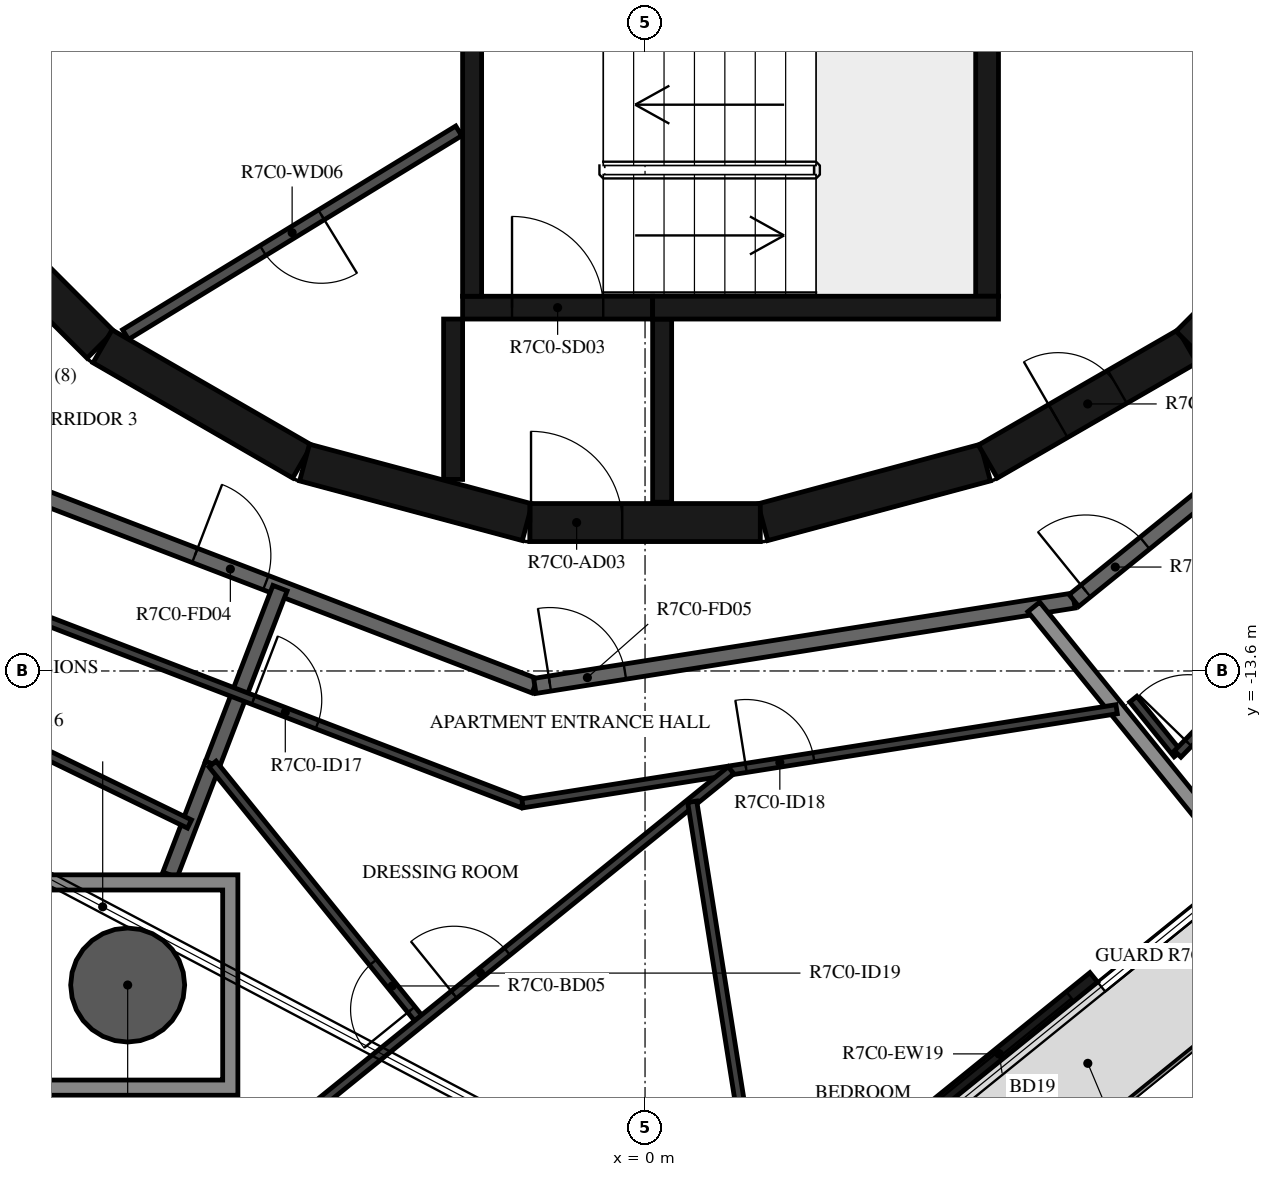
"""IFC4 building model, lengths in metres.
Left out: names, types, materials, properties, quantities, classifications, styles, units other than length and angle.
Written with IfcOpenShell. Run it as: python <this file> out.ifc"""

import sys

from ifc_helpers import new_model, si_unit, direction, frame, frame_2d, origin, origin_2d, place, context, subcontext, project, spatial, polyline, rectangle, hollow_circle, outline, extrude, element, fill, save


model = new_model("IFC4")
c1 = context("Model", 3, precision=1e-05, world=origin(), true_north=direction((0.0, 1.0)))
c2 = subcontext(c1, "Body", "Model", "MODEL_VIEW")
j1 = project(units=[si_unit("LENGTHUNIT", "METRE"), si_unit("PLANEANGLEUNIT", "RADIAN")], contexts=[c1])
p1 = place(None, origin())
s1 = spatial("IfcSite", under=j1, at=p1, CompositionType="ELEMENT")
p2 = place(p1, origin())
s2 = spatial("IfcBuilding", under=s1, at=p2, CompositionType="ELEMENT")
p3 = place(p2, frame((0.0, 0.0, 284.4)))
s3 = spatial("IfcBuildingStorey", under=s2, at=p3, CompositionType="ELEMENT", Elevation=284.4)
p4 = place(p3, frame((-6.807, -17.732, -0.38), z_axis=(0.0, 0.0, 1.0), x_axis=(1.0, 0.0, 0.0)))
e1 = element("IfcColumn", 1, at=p4, inside=s3, PredefinedType="COLUMN", context=c2, shape_type="SweptSolid", body=[
    extrude(hollow_circle(Radius=0.75, WallThickness=0.035, at=origin_2d()), origin(), (0.0, 0.0, 1.0), 3.5),
])
p5 = place(p3, frame((3.417, -19.645, 0.0), z_axis=(0.0, 0.0, 1.0), x_axis=(0.777125818, 0.629345265333, 0.0)))
e2 = element("IfcWall", 2, at=p5, inside=s3, PredefinedType="STANDARD", context=c2, shape_type="SweptSolid", body=[
    extrude(rectangle(XDim=3.2, YDim=0.16, at=frame_2d((1.6, 0.0))), origin(), (0.0, 0.0, 1.0), 3.12),
])
p6 = place(p5, frame((0.4, 0.0, 0.0)))
e3 = element("IfcOpeningElement", 3, at=p6, cuts=e2, PredefinedType="OPENING", context=c2, shape_type="SweptSolid", body=[
    extrude(rectangle(XDim=2.4, YDim=2.4, at=frame_2d((1.2, 1.2))), frame((0.0, 0.09, 0.0), z_axis=(0.0, -1.0, 0.0), x_axis=(1.0, 0.0, 0.0)), (0.0, 0.0, 1.0), 0.18),
])
p7 = place(p3, frame((1.55, -11.643, 0.0), z_axis=(0.0, 0.0, 1.0), x_axis=(0.965948410781, 0.258734743916, 0.0)))
e4 = element("IfcWall", 4, at=p7, inside=s3, PredefinedType="SHEAR", context=c2, shape_type="SweptSolid", body=[
    extrude(rectangle(XDim=3.033, YDim=0.5, at=frame_2d((1.516, 0.0))), origin(), (0.0, 0.0, 1.0), 3.12),
])
p8 = place(p3, frame((4.51, -10.845, 0.0), z_axis=(0.0, 0.0, 1.0), x_axis=(0.865975092491, 0.500087131594, 0.0)))
e5 = element("IfcWall", 5, at=p8, inside=s3, PredefinedType="SHEAR", context=c2, shape_type="SweptSolid", body=[
    extrude(rectangle(XDim=3.033, YDim=0.5, at=frame_2d((1.516, 0.0))), origin(), (0.0, 0.0, 1.0), 3.12),
])
p9 = place(p8, frame((1.066, 0.0, 0.0)))
e6 = element("IfcOpeningElement", 6, at=p9, cuts=e5, PredefinedType="OPENING", context=c2, shape_type="SweptSolid", body=[
    extrude(rectangle(XDim=0.9, YDim=2.1, at=frame_2d((0.45, 1.05))), frame((0.0, 0.26, 0.0), z_axis=(0.0, -1.0, 0.0), x_axis=(1.0, 0.0, 0.0)), (0.0, 0.0, 1.0), 0.52),
])
for number, where, z_axis, x_axis in (
    (7, (7.164, -9.308, 0.0), (0.0, 0.0, 1.0), (0.707, 0.707, 0.0)),
    (8, (-9.308, -7.164, 0.0), (0.0, 0.0, 1.0), (0.707, -0.707, 0.0)),
):
    element("IfcWall", number, at=place(p3, frame(where, z_axis=z_axis, x_axis=x_axis)), inside=s3, PredefinedType="SHEAR", context=c2, shape_type="SweptSolid", body=[
        extrude(rectangle(XDim=3.032, YDim=0.5, at=frame_2d((1.516, 0.0))), origin(), (0.0, 0.0, 1.0), 3.12),
    ])
for number, where, z_axis, x_axis in (
    (9, (-7.137, -9.329, 0.0), (0.0, 0.0, 1.0), (0.866, -0.5, 0.0)),
    (10, (-4.479, -10.858, 0.0), (0.0, 0.0, 1.0), (0.966, -0.259, 0.0)),
):
    element("IfcWall", number, at=place(p3, frame(where, z_axis=z_axis, x_axis=x_axis)), inside=s3, PredefinedType="SHEAR", context=c2, shape_type="SweptSolid", body=[
        extrude(rectangle(XDim=3.033, YDim=0.5, at=frame_2d((1.516, 0.0))), origin(), (0.0, 0.0, 1.0), 3.12),
    ])
p10 = place(p3, frame((-1.516, -11.647, 0.0), z_axis=(0.0, 0.0, 1.0), x_axis=(1.0, 0.0, 0.0)))
e11 = element("IfcWall", 11, at=p10, inside=s3, PredefinedType="SHEAR", context=c2, shape_type="SweptSolid", body=[
    extrude(rectangle(XDim=3.033, YDim=0.5, at=frame_2d((1.516, 0.0))), origin(), (0.0, 0.0, 1.0), 3.12),
])
p11 = place(p10, frame((0.016, 0.0, 0.0)))
e12 = element("IfcOpeningElement", 12, at=p11, cuts=e11, PredefinedType="OPENING", context=c2, shape_type="SweptSolid", body=[
    extrude(rectangle(XDim=1.2, YDim=2.1, at=frame_2d((0.6, 1.05))), frame((0.0, 0.26, 0.0), z_axis=(0.0, -1.0, 0.0), x_axis=(1.0, 0.0, 0.0)), (0.0, 0.0, 1.0), 0.52),
])
p12 = place(p3, frame((-2.275, -8.67, 0.0), z_axis=(0.0, 0.0, 1.0), x_axis=(0.0, 1.0, 0.0)))
e13 = element("IfcWall", 13, at=p12, inside=s3, PredefinedType="SHEAR", context=c2, shape_type="SweptSolid", body=[
    extrude(rectangle(XDim=3.32, YDim=0.25, at=frame_2d((1.66, 0.0))), origin(), (0.0, 0.0, 1.0), 3.12),
])
p13 = place(p3, frame((4.5, -8.67, 0.0), z_axis=(0.0, 0.0, 1.0), x_axis=(0.0, 1.0, 0.0)))
e14 = element("IfcWall", 14, at=p13, inside=s3, PredefinedType="SHEAR", context=c2, shape_type="SweptSolid", body=[
    extrude(rectangle(XDim=3.32, YDim=0.3, at=frame_2d((1.66, 0.0))), origin(), (0.0, 0.0, 1.0), 3.12),
])
p14 = place(p3, frame((0.1, -8.82, 0.0), z_axis=(0.0, 0.0, 1.0), x_axis=(1.0, 0.0, 0.0)))
e15 = element("IfcWall", 15, at=p14, inside=s3, PredefinedType="SHEAR", context=c2, shape_type="SweptSolid", body=[
    extrude(rectangle(XDim=4.55, YDim=0.3, at=frame_2d((2.275, 0.0))), origin(), (0.0, 0.0, 1.0), 3.12),
])
p15 = place(p3, frame((-2.4, -8.82, 0.0), z_axis=(0.0, 0.0, 1.0), x_axis=(1.0, 0.0, 0.0)))
e16 = element("IfcWall", 16, at=p15, inside=s3, PredefinedType="SHEAR", context=c2, shape_type="SweptSolid", body=[
    extrude(rectangle(XDim=2.5, YDim=0.3, at=frame_2d((1.25, 0.0))), origin(), (0.0, 0.0, 1.0), 3.12),
])
p16 = place(p15, frame((0.65, 0.0, 0.0)))
e17 = element("IfcOpeningElement", 17, at=p16, cuts=e16, PredefinedType="OPENING", context=c2, shape_type="SweptSolid", body=[
    extrude(rectangle(XDim=1.2, YDim=2.1, at=frame_2d((0.6, 1.05))), frame((0.0, 0.16, 0.0), z_axis=(0.0, -1.0, 0.0), x_axis=(1.0, 0.0, 0.0)), (0.0, 0.0, 1.0), 0.32),
])
p17 = place(p3, frame((-2.525, -8.97, 0.0), z_axis=(0.0, 0.0, 1.0), x_axis=(0.0, -1.0, 0.0)))
e18 = element("IfcWall", 18, at=p17, inside=s3, PredefinedType="SHEAR", context=c2, shape_type="SweptSolid", body=[
    extrude(rectangle(XDim=2.11, YDim=0.25, at=frame_2d((1.055, 0.0))), origin(), (0.0, 0.0, 1.0), 3.12),
])
p18 = place(p3, frame((0.225, -8.97, 0.0), z_axis=(0.0, 0.0, 1.0), x_axis=(0.0, -1.0, 0.0)))
e19 = element("IfcWall", 19, at=p18, inside=s3, PredefinedType="SHEAR", context=c2, shape_type="SweptSolid", body=[
    extrude(rectangle(XDim=2.41, YDim=0.25, at=frame_2d((1.205, 0.0))), origin(), (0.0, 0.0, 1.0), 3.12),
])
p19 = place(p3, frame((-2.451, -6.495, 0.0), z_axis=(0.0, 0.0, 1.0), x_axis=(-0.853250115418, -0.521501908471, 0.0)))
e20 = element("IfcWall", 20, at=p19, inside=s3, PredefinedType="PARTITIONING", context=c2, shape_type="SweptSolid", body=[
    extrude(rectangle(XDim=5.137, YDim=0.15, at=frame_2d((2.569, 0.0))), origin(), (0.0, 0.0, 1.0), 3.12),
])
p20 = place(p19, frame((2.119, 0.0, 0.0)))
e21 = element("IfcOpeningElement", 21, at=p20, cuts=e20, PredefinedType="OPENING", context=c2, shape_type="SweptSolid", body=[
    extrude(rectangle(XDim=0.9, YDim=2.1, at=frame_2d((0.45, 1.05))), frame((0.0, 0.085, 0.0), z_axis=(0.0, -1.0, 0.0), x_axis=(1.0, 0.0, 0.0)), (0.0, 0.0, 1.0), 0.17),
])
p21 = place(p3, frame((-8.154, -11.223, 0.0), z_axis=(0.0, 0.0, 1.0), x_axis=(0.93359073609, -0.358341090983, 0.0)))
e22 = element("IfcWall", 22, at=p21, inside=s3, PredefinedType="STANDARD", context=c2, shape_type="SweptSolid", body=[
    extrude(rectangle(XDim=7.181, YDim=0.2, at=frame_2d((3.59, 0.0))), origin(), (0.0, 0.0, 1.0), 3.12),
])
p22 = place(p21, frame((2.39, 0.0, 0.0)))
e23 = element("IfcOpeningElement", 23, at=p22, cuts=e22, PredefinedType="OPENING", context=c2, shape_type="SweptSolid", body=[
    extrude(rectangle(XDim=1.0, YDim=2.1, at=frame_2d((0.5, 1.05))), frame((0.0, 0.11, 0.0), z_axis=(0.0, -1.0, 0.0), x_axis=(1.0, 0.0, 0.0)), (0.0, 0.0, 1.0), 0.22),
])
p23 = place(p3, frame((-1.45, -13.797, 0.0), z_axis=(0.0, 0.0, 1.0), x_axis=(0.987690361611, 0.156421704315, 0.0)))
e24 = element("IfcWall", 24, at=p23, inside=s3, PredefinedType="STANDARD", context=c2, shape_type="SweptSolid", body=[
    extrude(rectangle(XDim=7.181, YDim=0.2, at=frame_2d((3.591, 0.0))), origin(), (0.0, 0.0, 1.0), 3.12),
])
p24 = place(p23, frame((0.2, 0.0, 0.0)))
e25 = element("IfcOpeningElement", 25, at=p24, cuts=e24, PredefinedType="OPENING", context=c2, shape_type="SweptSolid", body=[
    extrude(rectangle(XDim=1.0, YDim=2.1, at=frame_2d((0.5, 1.05))), frame((0.0, 0.11, 0.0), z_axis=(0.0, -1.0, 0.0), x_axis=(1.0, 0.0, 0.0)), (0.0, 0.0, 1.0), 0.22),
])
p25 = place(p3, frame((5.643, -12.673, 0.0), z_axis=(0.0, 0.0, 1.0), x_axis=(0.777160148113, 0.629302871585, 0.0)))
e26 = element("IfcWall", 26, at=p25, inside=s3, PredefinedType="STANDARD", context=c2, shape_type="SweptSolid", body=[
    extrude(rectangle(XDim=7.181, YDim=0.2, at=frame_2d((3.59, 0.0))), origin(), (0.0, 0.0, 1.0), 3.12),
])
p26 = place(p25, frame((0.2, 0.0, 0.0)))
e27 = element("IfcOpeningElement", 27, at=p26, cuts=e26, PredefinedType="OPENING", context=c2, shape_type="SweptSolid", body=[
    extrude(rectangle(XDim=1.0, YDim=2.1, at=frame_2d((0.5, 1.05))), frame((0.0, 0.11, 0.0), z_axis=(0.0, -1.0, 0.0), x_axis=(1.0, 0.0, 0.0)), (0.0, 0.0, 1.0), 0.22),
])
p27 = place(p3, frame((-5.69, -14.824, 0.0), z_axis=(0.0, 0.0, 1.0), x_axis=(0.358345342952, 0.933589104041, 0.0)))
e28 = element("IfcWall", 28, at=p27, inside=s3, PredefinedType="STANDARD", context=c2, shape_type="SweptSolid", body=[
    extrude(rectangle(XDim=2.479, YDim=0.2, at=frame_2d((1.239, 0.0))), origin(), (0.0, 0.0, 1.0), 3.12),
])
p28 = place(p3, frame((-6.25, -16.282, 0.0), z_axis=(0.0, 0.0, 1.0), x_axis=(0.358360842469, 0.933583154617, 0.0)))
e29 = element("IfcWall", 29, at=p28, inside=s3, PredefinedType="STANDARD", context=c2, shape_type="SweptSolid", body=[
    extrude(rectangle(XDim=1.562, YDim=0.2, at=frame_2d((0.781, 0.0))), origin(), (0.0, 0.0, 1.0), 3.12),
])
p29 = place(p3, frame((-10.637, -24.738, 0.0), z_axis=(0.0, 0.0, 1.0), x_axis=(0.479683887596, 0.877441375808, 0.0)))
e30 = element("IfcWall", 30, at=p29, inside=s3, PredefinedType="STANDARD", context=c2, shape_type="SweptSolid", body=[
    extrude(rectangle(XDim=6.333, YDim=0.2, at=frame_2d((3.166, 0.0))), origin(), (0.0, 0.0, 1.0), 2.73),
])
p30 = place(p3, frame((7.861, -16.148, 0.0), z_axis=(0.0, 0.0, 1.0), x_axis=(-0.629330189513, 0.777138026716, 0.0)))
e31 = element("IfcWall", 31, at=p30, inside=s3, PredefinedType="STANDARD", context=c2, shape_type="SweptSolid", body=[
    extrude(rectangle(XDim=4.364, YDim=0.2, at=frame_2d((2.182, 0.0))), origin(), (0.0, 0.0, 1.0), 2.73),
])
p31 = place(p3, frame((-9.067, -12.479, 0.0), z_axis=(0.0, 0.0, 1.0), x_axis=(0.933579449035, -0.358370495911, 0.0)))
e32 = element("IfcWall", 32, at=p31, inside=s3, PredefinedType="PARTITIONING", context=c2, shape_type="SweptSolid", body=[
    extrude(rectangle(XDim=7.985, YDim=0.12, at=frame_2d((3.992, 0.0))), origin(), (0.0, 0.0, 1.0), 3.12),
])
p32 = place(p31, frame((4.192, 0.0, 0.0)))
e33 = element("IfcOpeningElement", 33, at=p32, cuts=e32, PredefinedType="OPENING", context=c2, shape_type="SweptSolid", body=[
    extrude(rectangle(XDim=0.9, YDim=2.1, at=frame_2d((0.45, 1.05))), frame((0.0, 0.07, 0.0), z_axis=(0.0, -1.0, 0.0), x_axis=(1.0, 0.0, 0.0)), (0.0, 0.0, 1.0), 0.14),
])
p33 = place(p3, frame((-12.064, -12.662, 0.0), z_axis=(0.0, 0.0, 1.0), x_axis=(0.899383852228, -0.437159794985, 0.0)))
e34 = element("IfcWall", 34, at=p33, inside=s3, PredefinedType="PARTITIONING", context=c2, shape_type="SweptSolid", body=[
    extrude(rectangle(XDim=6.75, YDim=0.12, at=frame_2d((3.375, 0.0))), origin(), (0.0, 0.0, 1.0), 3.12),
])
p34 = place(p33, frame((0.5, 0.0, 0.0)))
e35 = element("IfcOpeningElement", 35, at=p34, cuts=e34, PredefinedType="OPENING", context=c2, shape_type="SweptSolid", body=[
    extrude(rectangle(XDim=0.9, YDim=2.1, at=frame_2d((0.45, 1.05))), frame((0.0, 0.07, 0.0), z_axis=(0.0, -1.0, 0.0), x_axis=(1.0, 0.0, 0.0)), (0.0, 0.0, 1.0), 0.14),
])
p35 = place(p3, frame((-1.612, -15.341, 0.0), z_axis=(0.0, 0.0, 1.0), x_axis=(0.987687560018, 0.15643939333, 0.0)))
e36 = element("IfcWall", 36, at=p35, inside=s3, PredefinedType="PARTITIONING", context=c2, shape_type="SweptSolid", body=[
    extrude(rectangle(XDim=7.914, YDim=0.12, at=frame_2d((3.957, 0.0))), origin(), (0.0, 0.0, 1.0), 3.12),
])
p36 = place(p35, frame((2.978, 0.0, 0.0)))
e37 = element("IfcOpeningElement", 37, at=p36, cuts=e36, PredefinedType="OPENING", context=c2, shape_type="SweptSolid", body=[
    extrude(rectangle(XDim=0.9, YDim=2.1, at=frame_2d((0.45, 1.05))), frame((0.0, 0.07, 0.0), z_axis=(0.0, -1.0, 0.0), x_axis=(1.0, 0.0, 0.0)), (0.0, 0.0, 1.0), 0.14),
])
p37 = place(p3, frame((-2.948, -18.21, 0.0), z_axis=(0.0, 0.0, 1.0), x_axis=(-0.629330389268, 0.777137864953, 0.0)))
e38 = element("IfcWall", 38, at=p37, inside=s3, PredefinedType="PARTITIONING", context=c2, shape_type="SweptSolid", body=[
    extrude(rectangle(XDim=4.357, YDim=0.12, at=frame_2d((2.179, 0.0))), origin(), (0.0, 0.0, 1.0), 3.12),
])
p38 = place(p37, frame((0.2, 0.0, 0.0)))
e39 = element("IfcOpeningElement", 39, at=p38, cuts=e38, PredefinedType="OPENING", context=c2, shape_type="SweptSolid", body=[
    extrude(rectangle(XDim=0.8, YDim=2.1, at=frame_2d((0.4, 1.05))), frame((0.0, 0.07, 0.0), z_axis=(0.0, -1.0, 0.0), x_axis=(1.0, 0.0, 0.0)), (0.0, 0.0, 1.0), 0.14),
])
p39 = place(p3, frame((-4.809, -19.717, 0.0), z_axis=(0.0, 0.0, 1.0), x_axis=(0.777140730041, 0.629326851255, 0.0)))
e40 = element("IfcWall", 40, at=p39, inside=s3, PredefinedType="PARTITIONING", context=c2, shape_type="SweptSolid", body=[
    extrude(rectangle(XDim=7.644, YDim=0.12, at=frame_2d((3.822, 0.0))), origin(), (0.0, 0.0, 1.0), 3.12),
])
p40 = place(p39, frame((2.954, 0.0, 0.0)))
e41 = element("IfcOpeningElement", 41, at=p40, cuts=e40, PredefinedType="OPENING", context=c2, shape_type="SweptSolid", body=[
    extrude(rectangle(XDim=0.9, YDim=2.1, at=frame_2d((0.45, 1.05))), frame((0.0, 0.07, 0.0), z_axis=(0.0, -1.0, 0.0), x_axis=(1.0, 0.0, 0.0)), (0.0, 0.0, 1.0), 0.14),
])
p41 = place(p3, frame((1.56, -21.251, 0.0), z_axis=(0.0, 0.0, 1.0), x_axis=(-0.156421913213, 0.987690328528, 0.0)))
e42 = element("IfcWall", 42, at=p41, inside=s3, PredefinedType="PARTITIONING", context=c2, shape_type="SweptSolid", body=[
    extrude(rectangle(XDim=6.004, YDim=0.12, at=frame_2d((3.002, 0.0))), origin(), (0.0, 0.0, 1.0), 3.12),
])
p42 = place(p3, frame((6.424, -13.971, 0.0), z_axis=(0.0, 0.0, 1.0), x_axis=(0.629273936268, -0.777183577499, 0.0)))
e43 = element("IfcWall", 43, at=p42, inside=s3, PredefinedType="PARTITIONING", context=c2, shape_type="SweptSolid", body=[
    extrude(rectangle(XDim=0.928, YDim=0.12, at=frame_2d((0.464, 0.0))), origin(), (0.0, 0.0, 1.0), 3.12),
])
p43 = place(p3, frame((7.007, -14.692, 0.0), z_axis=(0.0, 0.0, 1.0), x_axis=(0.697286714348, 0.716792325568, 0.0)))
e44 = element("IfcWall", 44, at=p43, inside=s3, PredefinedType="PARTITIONING", context=c2, shape_type="SweptSolid", body=[
    extrude(rectangle(XDim=7.848, YDim=0.12, at=frame_2d((3.924, 0.0))), origin(), (0.0, 0.0, 1.0), 3.12),
])
p44 = place(p43, frame((0.2, 0.0, 0.0)))
e45 = element("IfcOpeningElement", 45, at=p44, cuts=e44, PredefinedType="OPENING", context=c2, shape_type="SweptSolid", body=[
    extrude(rectangle(XDim=0.9, YDim=2.1, at=frame_2d((0.45, 1.05))), frame((0.0, 0.07, 0.0), z_axis=(0.0, -1.0, 0.0), x_axis=(1.0, 0.0, 0.0)), (0.0, 0.0, 1.0), 0.14),
])
p45 = place(p3, origin())
e46 = element("IfcWall", 46, at=p45, inside=s3, PredefinedType="STANDARD", context=c2, shape_type="SweptSolid", body=[
    extrude(outline(polyline([(-5.357, -16.282), (-5.357, -19.182), (-8.257, -19.182), (-8.257, -16.282), (-5.357, -16.282)]), holes=[polyline([(-8.057, -18.982), (-5.557, -18.982), (-5.557, -16.482), (-8.057, -16.482), (-8.057, -18.982)])]), origin(), (0.0, 0.0, 1.0), 3.12),
])
p46 = place(p6, origin())
e47 = element("IfcDoor", 47, at=p46, inside=s3, OperationType="DOUBLE_DOOR_SLIDING", PredefinedType="DOOR", context=c2, shape_type="SweptSolid", body=[
    extrude(rectangle(XDim=2.4, YDim=2.4, at=frame_2d((1.2, 1.2))), frame((0.0, 0.025, 0.0), z_axis=(0.0, -1.0, 0.0), x_axis=(1.0, 0.0, 0.0)), (0.0, 0.0, 1.0), 0.05),
])
fill(e3, e47)
p47 = place(p16, origin())
e48 = element("IfcDoor", 48, at=p47, inside=s3, OperationType="SINGLE_SWING_LEFT", PredefinedType="DOOR", context=c2, shape_type="SweptSolid", body=[
    extrude(rectangle(XDim=1.2, YDim=2.1, at=frame_2d((0.6, 1.05))), frame((0.0, 0.025, 0.0), z_axis=(0.0, -1.0, 0.0), x_axis=(1.0, 0.0, 0.0)), (0.0, 0.0, 1.0), 0.05),
])
fill(e17, e48)
p48 = place(p11, origin())
e49 = element("IfcDoor", 49, at=p48, inside=s3, OperationType="SINGLE_SWING_RIGHT", PredefinedType="DOOR", context=c2, shape_type="SweptSolid", body=[
    extrude(rectangle(XDim=1.2, YDim=2.1, at=frame_2d((0.6, 1.05))), frame((0.0, 0.025, 0.0), z_axis=(0.0, -1.0, 0.0), x_axis=(1.0, 0.0, 0.0)), (0.0, 0.0, 1.0), 0.05),
])
fill(e12, e49)
p49 = place(p20, origin())
e50 = element("IfcDoor", 50, at=p49, inside=s3, OperationType="SINGLE_SWING_RIGHT", PredefinedType="DOOR", context=c2, shape_type="SweptSolid", body=[
    extrude(rectangle(XDim=0.9, YDim=2.1, at=frame_2d((0.45, 1.05))), frame((0.0, 0.025, 0.0), z_axis=(0.0, -1.0, 0.0), x_axis=(1.0, 0.0, 0.0)), (0.0, 0.0, 1.0), 0.05),
])
fill(e21, e50)
p50 = place(p9, origin())
e51 = element("IfcDoor", 51, at=p50, inside=s3, OperationType="SINGLE_SWING_LEFT", PredefinedType="DOOR", context=c2, shape_type="SweptSolid", body=[
    extrude(rectangle(XDim=0.9, YDim=2.1, at=frame_2d((0.45, 1.05))), frame((0.0, 0.025, 0.0), z_axis=(0.0, -1.0, 0.0), x_axis=(1.0, 0.0, 0.0)), (0.0, 0.0, 1.0), 0.05),
])
fill(e6, e51)
p51 = place(p22, origin())
e52 = element("IfcDoor", 52, at=p51, inside=s3, OperationType="SINGLE_SWING_RIGHT", PredefinedType="DOOR", context=c2, shape_type="SweptSolid", body=[
    extrude(rectangle(XDim=1.0, YDim=2.1, at=frame_2d((0.5, 1.05))), frame((0.0, 0.025, 0.0), z_axis=(0.0, -1.0, 0.0), x_axis=(1.0, 0.0, 0.0)), (0.0, 0.0, 1.0), 0.05),
])
fill(e23, e52)
p52 = place(p24, origin())
e53 = element("IfcDoor", 53, at=p52, inside=s3, OperationType="SINGLE_SWING_LEFT", PredefinedType="DOOR", context=c2, shape_type="SweptSolid", body=[
    extrude(rectangle(XDim=1.0, YDim=2.1, at=frame_2d((0.5, 1.05))), frame((0.0, 0.025, 0.0), z_axis=(0.0, -1.0, 0.0), x_axis=(1.0, 0.0, 0.0)), (0.0, 0.0, 1.0), 0.05),
])
fill(e25, e53)
p53 = place(p32, origin())
e54 = element("IfcDoor", 54, at=p53, inside=s3, OperationType="SINGLE_SWING_RIGHT", PredefinedType="DOOR", context=c2, shape_type="SweptSolid", body=[
    extrude(rectangle(XDim=0.9, YDim=2.1, at=frame_2d((0.45, 1.05))), frame((0.0, 0.025, 0.0), z_axis=(0.0, -1.0, 0.0), x_axis=(1.0, 0.0, 0.0)), (0.0, 0.0, 1.0), 0.05),
])
fill(e33, e54)
p54 = place(p36, origin())
e55 = element("IfcDoor", 55, at=p54, inside=s3, OperationType="SINGLE_SWING_LEFT", PredefinedType="DOOR", context=c2, shape_type="SweptSolid", body=[
    extrude(rectangle(XDim=0.9, YDim=2.1, at=frame_2d((0.45, 1.05))), frame((0.0, 0.025, 0.0), z_axis=(0.0, -1.0, 0.0), x_axis=(1.0, 0.0, 0.0)), (0.0, 0.0, 1.0), 0.05),
])
fill(e37, e55)
p55 = place(p38, origin())
e56 = element("IfcDoor", 56, at=p55, inside=s3, OperationType="SINGLE_SWING_LEFT", PredefinedType="DOOR", context=c2, shape_type="SweptSolid", body=[
    extrude(rectangle(XDim=0.8, YDim=2.1, at=frame_2d((0.4, 1.05))), frame((0.0, 0.025, 0.0), z_axis=(0.0, -1.0, 0.0), x_axis=(1.0, 0.0, 0.0)), (0.0, 0.0, 1.0), 0.05),
])
fill(e39, e56)
p56 = place(p40, origin())
e57 = element("IfcDoor", 57, at=p56, inside=s3, OperationType="SINGLE_SWING_LEFT", PredefinedType="DOOR", context=c2, shape_type="SweptSolid", body=[
    extrude(rectangle(XDim=0.9, YDim=2.1, at=frame_2d((0.45, 1.05))), frame((0.0, 0.025, 0.0), z_axis=(0.0, -1.0, 0.0), x_axis=(1.0, 0.0, 0.0)), (0.0, 0.0, 1.0), 0.05),
])
fill(e41, e57)
p57 = place(p26, origin())
e58 = element("IfcDoor", 58, at=p57, inside=s3, OperationType="SINGLE_SWING_LEFT", PredefinedType="DOOR", context=c2, shape_type="SweptSolid", body=[
    extrude(rectangle(XDim=1.0, YDim=2.1, at=frame_2d((0.5, 1.05))), frame((0.0, 0.025, 0.0), z_axis=(0.0, -1.0, 0.0), x_axis=(1.0, 0.0, 0.0)), (0.0, 0.0, 1.0), 0.05),
])
fill(e27, e58)
p58 = place(p44, origin())
e59 = element("IfcDoor", 59, at=p58, inside=s3, OperationType="SINGLE_SWING_LEFT", PredefinedType="DOOR", context=c2, shape_type="SweptSolid", body=[
    extrude(rectangle(XDim=0.9, YDim=2.1, at=frame_2d((0.45, 1.05))), frame((0.0, 0.025, 0.0), z_axis=(0.0, -1.0, 0.0), x_axis=(1.0, 0.0, 0.0)), (0.0, 0.0, 1.0), 0.05),
])
fill(e45, e59)
save(model, sys.argv[1])
